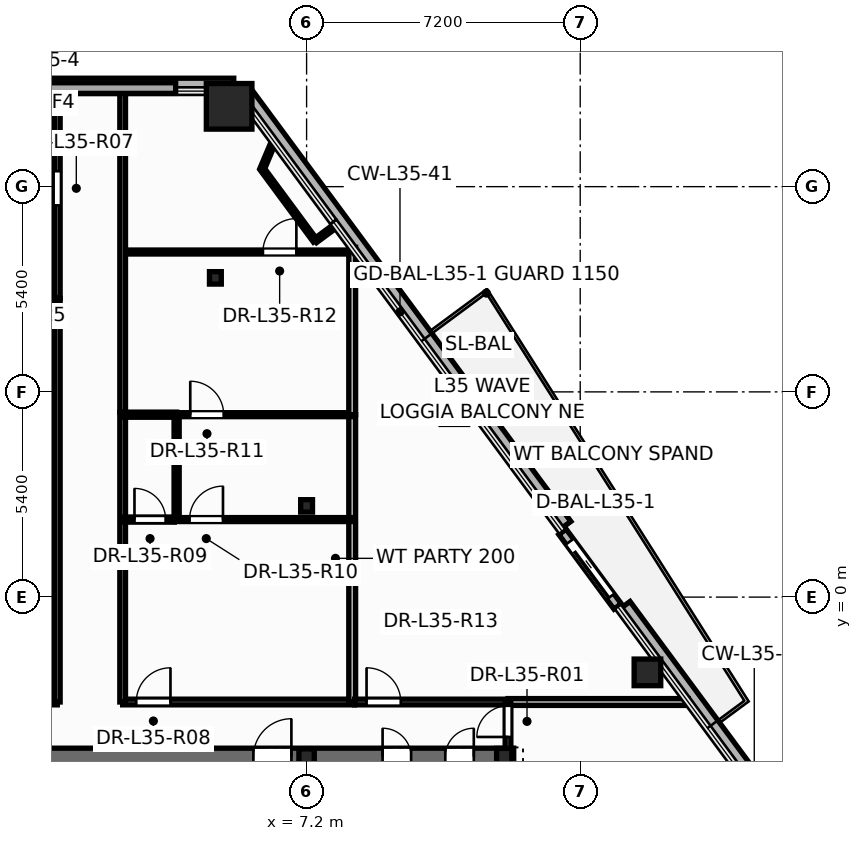
"""IFC4 building model, lengths in metres.
Left out: names, types, materials, properties, quantities, classifications, styles, units other than length and angle.
Written with IfcOpenShell. Run it as: python <this file> out.ifc"""

import sys

from ifc_helpers import new_model, si_unit, direction, frame, frame_2d, origin, origin_2d, place, context, subcontext, project, spatial, rectangle, hollow_rectangle, hollow_circle, i_section, extrude, element, fill, save


model = new_model("IFC4")
c1 = context("Model", 3, precision=1e-05, world=origin(), true_north=direction((0.0, 1.0)))
c2 = subcontext(c1, "Body", "Model", "MODEL_VIEW")
j1 = project(units=[si_unit("LENGTHUNIT", "METRE"), si_unit("PLANEANGLEUNIT", "RADIAN")], contexts=[c1])
p1 = place(None, origin())
s1 = spatial("IfcSite", under=j1, at=p1, CompositionType="ELEMENT")
p2 = place(p1, origin())
s2 = spatial("IfcBuilding", under=s1, at=p2, CompositionType="ELEMENT")
p3 = place(p2, frame((0.0, 0.0, 136.5)))
s3 = spatial("IfcBuildingStorey", under=s2, at=p3, CompositionType="ELEMENT", Elevation=136.5)
p4 = place(p3, frame((5.162, 12.914, 0.0), z_axis=(0.0, 0.0, 1.0), x_axis=(1.0, 0.0, 0.0)))
e1 = element("IfcColumn", 1, at=p4, inside=s3, PredefinedType="COLUMN", context=c2, shape_type="SweptSolid", body=[
    extrude(hollow_rectangle(XDim=1.2, YDim=1.2, WallThickness=0.055, at=origin_2d()), origin(), (0.0, 0.0, 1.0), 3.6),
])
for number, where, z_axis, x_axis in (
    (2, (16.169, -1.98, 0.0), (0.0, 0.0, 1.0), (1.0, 0.0, 0.0)),
    (3, (11.089, 4.894, 0.0), (0.0, 0.0, 1.0), (1.0, 0.0, 0.0)),
):
    element("IfcColumn", number, at=place(p3, frame(where, z_axis=z_axis, x_axis=x_axis)), inside=s3, PredefinedType="COLUMN", context=c2, shape_type="SweptSolid", body=[
        extrude(hollow_circle(Radius=0.35, WallThickness=0.03, at=origin_2d()), origin(), (0.0, 0.0, 1.0), 3.6),
    ])
p5 = place(p3, frame((12.4, -4.2, 0.0), z_axis=(0.0, 0.0, 1.0), x_axis=(1.0, 0.0, 0.0)))
e4 = element("IfcColumn", 4, at=p5, inside=s3, PredefinedType="COLUMN", context=c2, shape_type="SweptSolid", body=[
    extrude(i_section(OverallWidth=0.4, OverallDepth=0.44, WebThickness=0.028, FlangeThickness=0.04, at=origin_2d()), origin(), (0.0, 0.0, 1.0), 3.6),
])
p6 = place(p3, frame((7.2, -4.2, 0.0), z_axis=(0.0, 0.0, 1.0), x_axis=(1.0, 0.0, 0.0)))
e5 = element("IfcColumn", 5, at=p6, inside=s3, PredefinedType="PILASTER", context=c2, shape_type="SweptSolid", body=[
    extrude(i_section(OverallWidth=0.405, OverallDepth=0.414, WebThickness=0.022, FlangeThickness=0.032, at=origin_2d()), origin(), (0.0, 0.0, 1.0), 3.6),
])
for number, where, z_axis, x_axis in (
    (6, (7.2, 2.4, 0.0), (0.0, 0.0, 1.0), (1.0, 0.0, 0.0)),
    (7, (4.8, 8.4, 0.0), (0.0, 0.0, 1.0), (1.0, 0.0, 0.0)),
):
    element("IfcColumn", number, at=place(p3, frame(where, z_axis=z_axis, x_axis=x_axis)), inside=s3, PredefinedType="COLUMN", context=c2, shape_type="SweptSolid", body=[
        extrude(i_section(OverallWidth=0.311, OverallDepth=0.327, WebThickness=0.016, FlangeThickness=0.025, at=origin_2d()), origin(), (0.0, 0.0, 1.0), 3.6),
    ])
p7 = place(p3, frame((22.651, -9.809, -0.2), z_axis=(0.0, 0.0, 1.0), x_axis=(-0.594348443541, 0.804207639643, 0.0)))
e8 = element("IfcWall", 8, at=p7, inside=s3, PredefinedType="PARAPET", context=c2, shape_type="SweptSolid", body=[
    extrude(rectangle(XDim=11.92, YDim=0.36, at=frame_2d((5.96, 0.0))), origin(), (0.0, 0.0, 1.0), 0.38),
])
p8 = place(p3, frame((14.009, 1.884, -0.2), z_axis=(0.0, 0.0, 1.0), x_axis=(-0.594366423929, 0.804194350954, 0.0)))
e9 = element("IfcWall", 9, at=p8, inside=s3, PredefinedType="PARAPET", context=c2, shape_type="SweptSolid", body=[
    extrude(rectangle(XDim=14.21, YDim=0.36, at=frame_2d((7.105, 0.0))), origin(), (0.0, 0.0, 1.0), 0.38),
])
p9 = place(p3, frame((5.283, 13.473, -0.2), z_axis=(0.0, 0.0, 1.0), x_axis=(-1.0, 0.0, 0.0)))
e10 = element("IfcWall", 10, at=p9, inside=s3, PredefinedType="PARAPET", context=c2, shape_type="SweptSolid", body=[
    extrude(rectangle(XDim=10.566, YDim=0.36, at=frame_2d((5.283, 0.0))), origin(), (0.0, 0.0, 1.0), 0.38),
])
p10 = place(p3, frame((15.384, -0.246, -0.015), z_axis=(0.0, 0.0, 1.0), x_axis=(-0.594317914364, 0.804230201289, 0.0)))
e11 = element("IfcWall", 11, at=p10, inside=s3, PredefinedType="STANDARD", context=c2, shape_type="SweptSolid", body=[
    extrude(rectangle(XDim=2.44, YDim=0.24, at=frame_2d((1.22, 0.0))), origin(), (0.0, 0.0, 1.0), 2.807),
])
p11 = place(p10, frame((0.32, 0.0, 0.015)))
e12 = element("IfcOpeningElement", 12, at=p11, cuts=e11, PredefinedType="OPENING", context=c2, shape_type="SweptSolid", body=[
    extrude(rectangle(XDim=1.806, YDim=2.204, at=frame_2d((0.9, 1.102))), frame((0.0, 0.13, 0.0), z_axis=(0.0, -1.0, 0.0), x_axis=(1.0, 0.0, 0.0)), (0.0, 0.0, 1.0), 0.26),
])
p12 = place(p3, frame((-12.65, -4.2, 0.0), z_axis=(0.0, 0.0, 1.0), x_axis=(1.0, 0.0, 0.0)))
e13 = element("IfcWall", 13, at=p12, inside=s3, PredefinedType="SHEAR", context=c2, shape_type="SweptSolid", body=[
    extrude(rectangle(XDim=25.3, YDim=0.45, at=frame_2d((12.65, 0.0))), origin(), (0.0, 0.0, 1.0), 3.6),
])
p13 = place(p12, frame((0.95, 0.0, 0.0)))
e14 = element("IfcOpeningElement", 14, at=p13, cuts=e13, PredefinedType="OPENING", context=c2, shape_type="SweptSolid", body=[
    extrude(rectangle(XDim=0.756, YDim=2.054, at=frame_2d((0.375, 1.027))), frame((0.0, 0.235, 0.0), z_axis=(0.0, -1.0, 0.0), x_axis=(1.0, 0.0, 0.0)), (0.0, 0.0, 1.0), 0.47),
])
p14 = place(p12, frame((2.6, 0.0, 0.0)))
e15 = element("IfcOpeningElement", 15, at=p14, cuts=e13, PredefinedType="OPENING", context=c2, shape_type="SweptSolid", body=[
    extrude(rectangle(XDim=0.756, YDim=2.054, at=frame_2d((0.375, 1.027))), frame((0.0, 0.235, 0.0), z_axis=(0.0, -1.0, 0.0), x_axis=(1.0, 0.0, 0.0)), (0.0, 0.0, 1.0), 0.47),
])
p15 = place(p12, frame((21.85, 0.0, 0.0)))
e16 = element("IfcOpeningElement", 16, at=p15, cuts=e13, PredefinedType="OPENING", context=c2, shape_type="SweptSolid", body=[
    extrude(rectangle(XDim=0.756, YDim=2.054, at=frame_2d((0.375, 1.027))), frame((0.0, 0.235, 0.0), z_axis=(0.0, -1.0, 0.0), x_axis=(1.0, 0.0, 0.0)), (0.0, 0.0, 1.0), 0.47),
])
p16 = place(p12, frame((23.5, 0.0, 0.0)))
e17 = element("IfcOpeningElement", 17, at=p16, cuts=e13, PredefinedType="OPENING", context=c2, shape_type="SweptSolid", body=[
    extrude(rectangle(XDim=0.756, YDim=2.054, at=frame_2d((0.375, 1.027))), frame((0.0, 0.235, 0.0), z_axis=(0.0, -1.0, 0.0), x_axis=(1.0, 0.0, 0.0)), (0.0, 0.0, 1.0), 0.47),
])
p17 = place(p12, frame((5.85, 0.0, 0.0)))
e18 = element("IfcOpeningElement", 18, at=p17, cuts=e13, PredefinedType="OPENING", context=c2, shape_type="SweptSolid", body=[
    extrude(rectangle(XDim=1.006, YDim=2.104, at=frame_2d((0.5, 1.052))), frame((0.0, 0.235, 0.0), z_axis=(0.0, -1.0, 0.0), x_axis=(1.0, 0.0, 0.0)), (0.0, 0.0, 1.0), 0.47),
])
p18 = place(p12, frame((10.35, 0.0, 0.0)))
e19 = element("IfcOpeningElement", 19, at=p18, cuts=e13, PredefinedType="OPENING", context=c2, shape_type="SweptSolid", body=[
    extrude(rectangle(XDim=1.406, YDim=2.154, at=frame_2d((0.7, 1.077))), frame((0.0, 0.235, 0.0), z_axis=(0.0, -1.0, 0.0), x_axis=(1.0, 0.0, 0.0)), (0.0, 0.0, 1.0), 0.47),
])
p19 = place(p12, frame((18.45, 0.0, 0.0)))
e20 = element("IfcOpeningElement", 20, at=p19, cuts=e13, PredefinedType="OPENING", context=c2, shape_type="SweptSolid", body=[
    extrude(rectangle(XDim=1.006, YDim=2.104, at=frame_2d((0.5, 1.052))), frame((0.0, 0.235, 0.0), z_axis=(0.0, -1.0, 0.0), x_axis=(1.0, 0.0, 0.0)), (0.0, 0.0, 1.0), 0.47),
])
p20 = place(p3, frame((-12.5, -2.76, 0.0), z_axis=(0.0, 0.0, 1.0), x_axis=(1.0, 0.0, 0.0)))
e21 = element("IfcWall", 21, at=p20, inside=s3, PredefinedType="PARTITIONING", context=c2, shape_type="SweptSolid", body=[
    extrude(rectangle(XDim=13.14, YDim=0.15, at=frame_2d((6.57, 0.0))), origin(), (0.0, 0.0, 1.0), 2.325),
])
p21 = place(p20, frame((1.675, 0.0, 0.0)))
e22 = element("IfcOpeningElement", 22, at=p21, cuts=e21, PredefinedType="OPENING", context=c2, shape_type="SweptSolid", body=[
    extrude(rectangle(XDim=0.906, YDim=2.104, at=frame_2d((0.45, 1.052))), frame((0.0, 0.085, 0.0), z_axis=(0.0, -1.0, 0.0), x_axis=(1.0, 0.0, 0.0)), (0.0, 0.0, 1.0), 0.17),
])
p22 = place(p3, frame((0.64, -2.76, 0.0), z_axis=(0.0, 0.0, 1.0), x_axis=(0.0, 1.0, 0.0)))
e23 = element("IfcWall", 23, at=p22, inside=s3, PredefinedType="PARTITIONING", context=c2, shape_type="SweptSolid", body=[
    extrude(rectangle(XDim=10.62, YDim=0.15, at=frame_2d((5.31, 0.0))), origin(), (0.0, 0.0, 1.0), 2.325),
])
p23 = place(p3, frame((-9.438, 7.8, 0.0), z_axis=(0.0, 0.0, 1.0), x_axis=(1.0, 0.0, 0.0)))
e24 = element("IfcWall", 24, at=p23, inside=s3, PredefinedType="PARTITIONING", context=c2, shape_type="SweptSolid", body=[
    extrude(rectangle(XDim=10.078, YDim=0.105, at=frame_2d((5.039, 0.0))), origin(), (0.0, 0.0, 1.0), 2.325),
])
p24 = place(p3, frame((2.36, 9.08, 0.0), z_axis=(0.0, 0.0, 1.0), x_axis=(1.0, 0.0, 0.0)))
e25 = element("IfcWall", 25, at=p24, inside=s3, PredefinedType="PARTITIONING", context=c2, shape_type="SweptSolid", body=[
    extrude(rectangle(XDim=6.132, YDim=0.105, at=frame_2d((3.066, 0.0))), origin(), (0.0, 0.0, 1.0), 2.617),
])
p25 = place(p24, frame((3.691, 0.0, 0.0)))
e26 = element("IfcOpeningElement", 26, at=p25, cuts=e25, PredefinedType="OPENING", context=c2, shape_type="SweptSolid", body=[
    extrude(rectangle(XDim=0.886, YDim=2.104, at=frame_2d((0.44, 1.052))), frame((0.0, 0.062, 0.0), z_axis=(0.0, -1.0, 0.0), x_axis=(1.0, 0.0, 0.0)), (0.0, 0.0, 1.0), 0.125),
])
p26 = place(p3, frame((2.36, -2.76, 0.0), z_axis=(0.0, 0.0, 1.0), x_axis=(1.0, 0.0, 0.0)))
e27 = element("IfcWall", 27, at=p26, inside=s3, PredefinedType="PARTITIONING", context=c2, shape_type="SweptSolid", body=[
    extrude(rectangle(XDim=6.1, YDim=0.15, at=frame_2d((3.05, 0.0))), origin(), (0.0, 0.0, 1.0), 2.325),
])
p27 = place(p26, frame((0.358, 0.0, 0.0)))
e28 = element("IfcOpeningElement", 28, at=p27, cuts=e27, PredefinedType="OPENING", context=c2, shape_type="SweptSolid", body=[
    extrude(rectangle(XDim=0.906, YDim=2.104, at=frame_2d((0.45, 1.052))), frame((0.0, 0.085, 0.0), z_axis=(0.0, -1.0, 0.0), x_axis=(1.0, 0.0, 0.0)), (0.0, 0.0, 1.0), 0.17),
])
p28 = place(p3, frame((0.64, 7.862, 0.0), z_axis=(0.0, 0.0, 1.0), x_axis=(0.0, 1.0, 0.0)))
e29 = element("IfcWall", 29, at=p28, inside=s3, PredefinedType="PARTITIONING", context=c2, shape_type="SweptSolid", body=[
    extrude(rectangle(XDim=5.451, YDim=0.15, at=frame_2d((2.726, 0.0))), origin(), (0.0, 0.0, 1.0), 2.617),
])
p29 = place(p28, frame((2.445, 0.0, 0.0)))
e30 = element("IfcOpeningElement", 30, at=p29, cuts=e29, PredefinedType="OPENING", context=c2, shape_type="SweptSolid", body=[
    extrude(rectangle(XDim=0.906, YDim=2.104, at=frame_2d((0.45, 1.052))), frame((0.0, 0.085, 0.0), z_axis=(0.0, -1.0, 0.0), x_axis=(1.0, 0.0, 0.0)), (0.0, 0.0, 1.0), 0.17),
])
p30 = place(p3, frame((2.36, -2.76, 0.0), z_axis=(0.0, 0.0, 1.0), x_axis=(0.0, 1.0, 0.0)))
e31 = element("IfcWall", 31, at=p30, inside=s3, PredefinedType="PARTITIONING", context=c2, shape_type="SweptSolid", body=[
    extrude(rectangle(XDim=7.62, YDim=0.15, at=frame_2d((3.81, 0.0))), origin(), (0.0, 0.0, 1.0), 2.325),
])
p31 = place(p3, frame((8.4, -2.76, 0.0), z_axis=(0.0, 0.0, 1.0), x_axis=(0.0, 1.0, 0.0)))
e32 = element("IfcWall", 32, at=p31, inside=s3, PredefinedType="PARTITIONING", context=c2, shape_type="SweptSolid", body=[
    extrude(rectangle(XDim=7.56, YDim=0.18, at=frame_2d((3.78, 0.0))), origin(), (0.0, 0.0, 1.0), 2.617),
])
p32 = place(p3, frame((12.5, -2.76, 0.0), z_axis=(0.0, 0.0, 1.0), x_axis=(1.0, 0.0, 0.0)))
e33 = element("IfcWall", 33, at=p32, inside=s3, PredefinedType="PARTITIONING", context=c2, shape_type="SweptSolid", body=[
    extrude(rectangle(XDim=4.743, YDim=0.18, at=frame_2d((2.371, 0.0))), origin(), (0.0, 0.0, 1.0), 2.792),
])
p33 = place(p3, frame((3.72, 2.04, 0.0), z_axis=(0.0, 0.0, 1.0), x_axis=(1.0, 0.0, 0.0)))
e34 = element("IfcWall", 34, at=p33, inside=s3, PredefinedType="PARTITIONING", context=c2, shape_type="SweptSolid", body=[
    extrude(rectangle(XDim=4.68, YDim=0.105, at=frame_2d((2.34, 0.0))), origin(), (0.0, 0.0, 1.0), 2.325),
])
p34 = place(p33, frame((0.4, 0.0, 0.0)))
e35 = element("IfcOpeningElement", 35, at=p34, cuts=e34, PredefinedType="OPENING", context=c2, shape_type="SweptSolid", body=[
    extrude(rectangle(XDim=0.886, YDim=2.104, at=frame_2d((0.44, 1.052))), frame((0.0, 0.062, 0.0), z_axis=(0.0, -1.0, 0.0), x_axis=(1.0, 0.0, 0.0)), (0.0, 0.0, 1.0), 0.125),
])
p35 = place(p3, frame((3.78, 4.8, 0.0), z_axis=(0.0, 0.0, 1.0), x_axis=(1.0, 0.0, 0.0)))
e36 = element("IfcWall", 36, at=p35, inside=s3, PredefinedType="PARTITIONING", context=c2, shape_type="SweptSolid", body=[
    extrude(rectangle(XDim=4.62, YDim=0.105, at=frame_2d((2.31, 0.0))), origin(), (0.0, 0.0, 1.0), 2.617),
])
p36 = place(p35, frame((0.359, 0.0, 0.0)))
e37 = element("IfcOpeningElement", 37, at=p36, cuts=e36, PredefinedType="OPENING", context=c2, shape_type="SweptSolid", body=[
    extrude(rectangle(XDim=0.886, YDim=2.104, at=frame_2d((0.44, 1.052))), frame((0.0, 0.062, 0.0), z_axis=(0.0, -1.0, 0.0), x_axis=(1.0, 0.0, 0.0)), (0.0, 0.0, 1.0), 0.125),
])
p37 = place(p3, frame((8.4, 4.8, 0.0), z_axis=(0.0, 0.0, 1.0), x_axis=(0.0, 1.0, 0.0)))
e38 = element("IfcWall", 38, at=p37, inside=s3, PredefinedType="PARTITIONING", context=c2, shape_type="SweptSolid", body=[
    extrude(rectangle(XDim=4.405, YDim=0.18, at=frame_2d((2.202, 0.0))), origin(), (0.0, 0.0, 1.0), 2.617),
])
p38 = place(p3, frame((2.36, 4.862, 0.0), z_axis=(0.0, 0.0, 1.0), x_axis=(0.0, 1.0, 0.0)))
e39 = element("IfcWall", 39, at=p38, inside=s3, PredefinedType="PARTITIONING", context=c2, shape_type="SweptSolid", body=[
    extrude(rectangle(XDim=8.451, YDim=0.15, at=frame_2d((4.226, 0.0))), origin(), (0.0, 0.0, 1.0), 2.617),
])
p39 = place(p3, frame((8.462, -2.76, 0.0), z_axis=(0.0, 0.0, 1.0), x_axis=(1.0, 0.0, 0.0)))
e40 = element("IfcWall", 40, at=p39, inside=s3, PredefinedType="PARTITIONING", context=c2, shape_type="SweptSolid", body=[
    extrude(rectangle(XDim=4.038, YDim=0.15, at=frame_2d((2.019, 0.0))), origin(), (0.0, 0.0, 1.0), 3.35),
])
p40 = place(p39, frame((0.316, 0.0, 0.0)))
e41 = element("IfcOpeningElement", 41, at=p40, cuts=e40, PredefinedType="OPENING", context=c2, shape_type="SweptSolid", body=[
    extrude(rectangle(XDim=0.906, YDim=2.104, at=frame_2d((0.45, 1.052))), frame((0.0, 0.085, 0.0), z_axis=(0.0, -1.0, 0.0), x_axis=(1.0, 0.0, 0.0)), (0.0, 0.0, 1.0), 0.17),
])
p41 = place(p3, frame((3.78, 2.04, 0.0), z_axis=(0.0, 0.0, 1.0), x_axis=(0.0, 1.0, 0.0)))
e42 = element("IfcWall", 42, at=p41, inside=s3, PredefinedType="PARTITIONING", context=c2, shape_type="SweptSolid", body=[
    extrude(rectangle(XDim=2.76, YDim=0.135, at=frame_2d((1.38, 0.0))), origin(), (0.0, 0.0, 1.0), 2.325),
])
p42 = place(p3, frame((7.428, 9.376, 0.0), z_axis=(0.0, 0.0, 1.0), x_axis=(-0.594385220585, 0.804180458324, 0.0)))
e43 = element("IfcWall", 43, at=p42, inside=s3, PredefinedType="PARTITIONING", context=c2, shape_type="SweptSolid", body=[
    extrude(rectangle(XDim=2.351, YDim=0.12, at=frame_2d((1.175, 0.0))), origin(), (0.0, 0.0, 1.0), 3.35),
])
p43 = place(p3, frame((12.5, -4.24, 0.0), z_axis=(0.0, 0.0, 1.0), x_axis=(0.0, 1.0, 0.0)))
e44 = element("IfcWall", 44, at=p43, inside=s3, PredefinedType="PARTITIONING", context=c2, shape_type="SweptSolid", body=[
    extrude(rectangle(XDim=1.48, YDim=0.15, at=frame_2d((0.74, 0.0))), origin(), (0.0, 0.0, 1.0), 2.325),
])
p44 = place(p43, frame((0.56, 0.0, 0.0)))
e45 = element("IfcOpeningElement", 45, at=p44, cuts=e44, PredefinedType="OPENING", context=c2, shape_type="SweptSolid", body=[
    extrude(rectangle(XDim=0.826, YDim=2.104, at=frame_2d((0.41, 1.052))), frame((0.0, 0.085, 0.0), z_axis=(0.0, -1.0, 0.0), x_axis=(1.0, 0.0, 0.0)), (0.0, 0.0, 1.0), 0.17),
])
p45 = place(p3, frame((2.36, 2.04, 0.0), z_axis=(0.0, 0.0, 1.0), x_axis=(1.0, 0.0, 0.0)))
e46 = element("IfcWall", 46, at=p45, inside=s3, PredefinedType="PARTITIONING", context=c2, shape_type="SweptSolid", body=[
    extrude(rectangle(XDim=1.358, YDim=0.135, at=frame_2d((0.679, 0.0))), origin(), (0.0, 0.0, 1.0), 2.919),
])
p46 = place(p45, frame((0.311, 0.0, 0.0)))
e47 = element("IfcOpeningElement", 47, at=p46, cuts=e46, PredefinedType="OPENING", context=c2, shape_type="SweptSolid", body=[
    extrude(rectangle(XDim=0.826, YDim=2.104, at=frame_2d((0.41, 1.052))), frame((0.0, 0.078, 0.0), z_axis=(0.0, -1.0, 0.0), x_axis=(1.0, 0.0, 0.0)), (0.0, 0.0, 1.0), 0.155),
])
p47 = place(p3, frame((2.36, 4.8, 0.0), z_axis=(0.0, 0.0, 1.0), x_axis=(1.0, 0.0, 0.0)))
e48 = element("IfcWall", 48, at=p47, inside=s3, PredefinedType="PARTITIONING", context=c2, shape_type="SweptSolid", body=[
    extrude(rectangle(XDim=1.42, YDim=0.135, at=frame_2d((0.71, 0.0))), origin(), (0.0, 0.0, 1.0), 2.919),
])
p48 = place(p3, frame((0.64, 11.8, 0.0), z_axis=(0.0, 0.0, 1.0), x_axis=(1.0, 0.0, 0.0)))
e49 = element("IfcWall", 49, at=p48, inside=s3, PredefinedType="PARTITIONING", context=c2, shape_type="SweptSolid", body=[
    extrude(rectangle(XDim=1.72, YDim=0.15, at=frame_2d((0.86, 0.0))), origin(), (0.0, 0.0, 1.0), 3.35),
])
p49 = place(p3, frame((6.031, 11.267, 0.0), z_axis=(0.0, 0.0, 1.0), x_axis=(0.389486531809, 0.921032160969, 0.0)))
e50 = element("IfcWall", 50, at=p49, inside=s3, PredefinedType="PARTITIONING", context=c2, shape_type="SweptSolid", body=[
    extrude(rectangle(XDim=0.779, YDim=0.12, at=frame_2d((0.389, 0.0))), origin(), (0.0, 0.0, 1.0), 2.792),
])
p50 = place(p3, frame((7.967, 9.774, 0.0), z_axis=(0.0, 0.0, 1.0), x_axis=(-0.804221577226, -0.594329584257, 0.0)))
e51 = element("IfcWall", 51, at=p50, inside=s3, PredefinedType="PARTITIONING", context=c2, shape_type="SweptSolid", body=[
    extrude(rectangle(XDim=0.67, YDim=0.12, at=frame_2d((0.335, 0.0))), origin(), (0.0, 0.0, 1.0), 2.792),
])
p51 = place(p11, origin())
e52 = element("IfcDoor", 52, at=p51, inside=s3, OperationType="SLIDING_TO_LEFT", PredefinedType="DOOR", context=c2, shape_type="SweptSolid", body=[
    extrude(rectangle(XDim=1.8, YDim=2.2, at=frame_2d((0.9, 1.1))), frame((0.0, 0.025, 0.0), z_axis=(0.0, -1.0, 0.0), x_axis=(1.0, 0.0, 0.0)), (0.0, 0.0, 1.0), 0.05),
])
fill(e12, e52)
p52 = place(p15, origin())
e53 = element("IfcDoor", 53, at=p52, inside=s3, OperationType="SINGLE_SWING_LEFT", PredefinedType="DOOR", context=c2, shape_type="SweptSolid", body=[
    extrude(rectangle(XDim=0.75, YDim=2.05, at=frame_2d((0.375, 1.025))), frame((0.0, 0.025, 0.0), z_axis=(0.0, -1.0, 0.0), x_axis=(1.0, 0.0, 0.0)), (0.0, 0.0, 1.0), 0.05),
])
fill(e16, e53)
p53 = place(p16, origin())
e54 = element("IfcDoor", 54, at=p53, inside=s3, OperationType="SINGLE_SWING_RIGHT", PredefinedType="DOOR", context=c2, shape_type="SweptSolid", body=[
    extrude(rectangle(XDim=0.75, YDim=2.05, at=frame_2d((0.375, 1.025))), frame((0.0, 0.025, 0.0), z_axis=(0.0, -1.0, 0.0), x_axis=(1.0, 0.0, 0.0)), (0.0, 0.0, 1.0), 0.05),
])
fill(e17, e54)
p54 = place(p19, origin())
e55 = element("IfcDoor", 55, at=p54, inside=s3, OperationType="SINGLE_SWING_RIGHT", PredefinedType="DOOR", context=c2, shape_type="SweptSolid", body=[
    extrude(rectangle(XDim=1.0, YDim=2.1, at=frame_2d((0.5, 1.05))), frame((0.0, 0.025, 0.0), z_axis=(0.0, -1.0, 0.0), x_axis=(1.0, 0.0, 0.0)), (0.0, 0.0, 1.0), 0.05),
])
fill(e20, e55)
p55 = place(p44, origin())
e56 = element("IfcDoor", 56, at=p55, inside=s3, OperationType="SINGLE_SWING_LEFT", PredefinedType="DOOR", context=c2, shape_type="SweptSolid", body=[
    extrude(rectangle(XDim=0.82, YDim=2.1, at=frame_2d((0.41, 1.05))), frame((0.0, 0.025, 0.0), z_axis=(0.0, -1.0, 0.0), x_axis=(1.0, 0.0, 0.0)), (0.0, 0.0, 1.0), 0.05),
])
fill(e45, e56)
p56 = place(p29, origin())
e57 = element("IfcDoor", 57, at=p56, inside=s3, OperationType="SINGLE_SWING_LEFT", PredefinedType="DOOR", context=c2, shape_type="SweptSolid", body=[
    extrude(rectangle(XDim=0.9, YDim=2.1, at=frame_2d((0.45, 1.05))), frame((0.0, 0.025, 0.0), z_axis=(0.0, -1.0, 0.0), x_axis=(1.0, 0.0, 0.0)), (0.0, 0.0, 1.0), 0.05),
])
fill(e30, e57)
p57 = place(p27, origin())
e58 = element("IfcDoor", 58, at=p57, inside=s3, OperationType="SINGLE_SWING_RIGHT", PredefinedType="DOOR", context=c2, shape_type="SweptSolid", body=[
    extrude(rectangle(XDim=0.9, YDim=2.1, at=frame_2d((0.45, 1.05))), frame((0.0, 0.025, 0.0), z_axis=(0.0, -1.0, 0.0), x_axis=(1.0, 0.0, 0.0)), (0.0, 0.0, 1.0), 0.05),
])
fill(e28, e58)
p58 = place(p46, origin())
e59 = element("IfcDoor", 59, at=p58, inside=s3, OperationType="SINGLE_SWING_LEFT", PredefinedType="DOOR", context=c2, shape_type="SweptSolid", body=[
    extrude(rectangle(XDim=0.82, YDim=2.1, at=frame_2d((0.41, 1.05))), frame((0.0, 0.025, 0.0), z_axis=(0.0, -1.0, 0.0), x_axis=(1.0, 0.0, 0.0)), (0.0, 0.0, 1.0), 0.05),
])
fill(e47, e59)
p59 = place(p34, origin())
e60 = element("IfcDoor", 60, at=p59, inside=s3, OperationType="SINGLE_SWING_RIGHT", PredefinedType="DOOR", context=c2, shape_type="SweptSolid", body=[
    extrude(rectangle(XDim=0.88, YDim=2.1, at=frame_2d((0.44, 1.05))), frame((0.0, 0.025, 0.0), z_axis=(0.0, -1.0, 0.0), x_axis=(1.0, 0.0, 0.0)), (0.0, 0.0, 1.0), 0.05),
])
fill(e35, e60)
p60 = place(p36, origin())
e61 = element("IfcDoor", 61, at=p60, inside=s3, OperationType="SINGLE_SWING_LEFT", PredefinedType="DOOR", context=c2, shape_type="SweptSolid", body=[
    extrude(rectangle(XDim=0.88, YDim=2.1, at=frame_2d((0.44, 1.05))), frame((0.0, 0.025, 0.0), z_axis=(0.0, -1.0, 0.0), x_axis=(1.0, 0.0, 0.0)), (0.0, 0.0, 1.0), 0.05),
])
fill(e37, e61)
p61 = place(p25, origin())
e62 = element("IfcDoor", 62, at=p61, inside=s3, OperationType="SINGLE_SWING_RIGHT", PredefinedType="DOOR", context=c2, shape_type="SweptSolid", body=[
    extrude(rectangle(XDim=0.88, YDim=2.1, at=frame_2d((0.44, 1.05))), frame((0.0, 0.025, 0.0), z_axis=(0.0, -1.0, 0.0), x_axis=(1.0, 0.0, 0.0)), (0.0, 0.0, 1.0), 0.05),
])
fill(e26, e62)
p62 = place(p40, origin())
e63 = element("IfcDoor", 63, at=p62, inside=s3, OperationType="SINGLE_SWING_LEFT", PredefinedType="DOOR", context=c2, shape_type="SweptSolid", body=[
    extrude(rectangle(XDim=0.9, YDim=2.1, at=frame_2d((0.45, 1.05))), frame((0.0, 0.025, 0.0), z_axis=(0.0, -1.0, 0.0), x_axis=(1.0, 0.0, 0.0)), (0.0, 0.0, 1.0), 0.05),
])
fill(e41, e63)
save(model, sys.argv[1])
